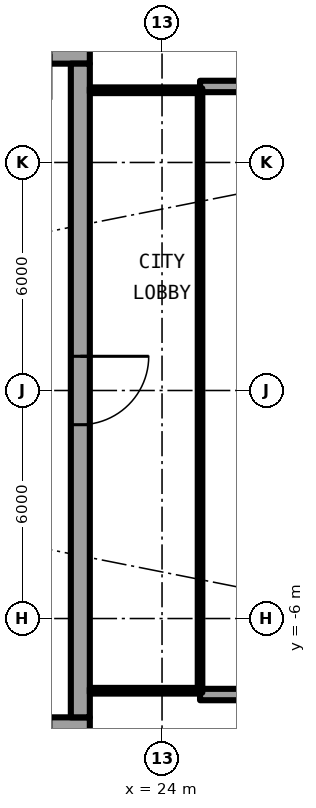
"""IFC4 building model, lengths in metres.
Left out: names, types, materials, properties, quantities, classifications, styles, units other than length and angle.
Written with IfcOpenShell. Run it as: python <this file> out.ifc"""

import sys

from ifc_helpers import new_model, si_unit, direction, frame, frame_2d, origin, place, context, subcontext, project, spatial, rectangle, extrude, element, fill, save


model = new_model("IFC4")
c1 = context("Model", 3, precision=1e-05, world=origin(), true_north=direction((0.0, 1.0)))
c2 = subcontext(c1, "Body", "Model", "MODEL_VIEW")
j1 = project(units=[si_unit("LENGTHUNIT", "METRE"), si_unit("PLANEANGLEUNIT", "RADIAN")], contexts=[c1])
p1 = place(None, origin())
s1 = spatial("IfcSite", under=j1, at=p1, CompositionType="ELEMENT")
p2 = place(p1, origin())
s2 = spatial("IfcBuilding", under=s1, at=p2, CompositionType="ELEMENT")
p3 = place(p2, frame((0.0, 0.0, 167.7)))
s3 = spatial("IfcBuildingStorey", under=s2, at=p3, CompositionType="ELEMENT", Elevation=167.7)
for number, where, z_axis, x_axis in (
    (1, (25.0, 8.0, 0.0), (0.0, 0.0, 1.0), (1.0, 0.0, 0.0)),
    (2, (25.0, -8.0, 0.0), (0.0, 0.0, 1.0), (1.0, 0.0, 0.0)),
):
    element("IfcWall", number, at=place(p3, frame(where, z_axis=z_axis, x_axis=x_axis)), inside=s3, PredefinedType="SOLIDWALL", context=c2, shape_type="SweptSolid", body=[
        extrude(rectangle(XDim=2.667, YDim=0.3, at=frame_2d((1.333, 0.0))), origin(), (0.0, 0.0, 1.0), 2.7),
    ])
p4 = place(p3, frame((22.1, 8.85, 0.0), z_axis=(0.0, 0.0, 1.0), x_axis=(-1.0, 0.0, 0.0)))
e3 = element("IfcWall", 3, at=p4, inside=s3, PredefinedType="SHEAR", context=c2, shape_type="SweptSolid", body=[
    extrude(rectangle(XDim=13.6, YDim=0.5, at=frame_2d((6.8, 0.0))), origin(), (0.0, 0.0, 1.0), 3.05),
])
p5 = place(p4, frame((1.025, 0.0, 0.0)))
e4 = element("IfcOpeningElement", 4, at=p5, cuts=e3, PredefinedType="OPENING", context=c2, shape_type="SweptSolid", body=[
    extrude(rectangle(XDim=1.2, YDim=2.3, at=frame_2d((0.6, 1.15))), frame((0.0, 0.26, 0.0), z_axis=(0.0, -1.0, 0.0), x_axis=(1.0, 0.0, 0.0)), (0.0, 0.0, 1.0), 0.52),
])
p6 = place(p3, frame((8.5, -8.85, 0.0), z_axis=(0.0, 0.0, 1.0), x_axis=(1.0, 0.0, 0.0)))
e5 = element("IfcWall", 5, at=p6, inside=s3, PredefinedType="SHEAR", context=c2, shape_type="SweptSolid", body=[
    extrude(rectangle(XDim=13.6, YDim=0.5, at=frame_2d((6.8, 0.0))), origin(), (0.0, 0.0, 1.0), 3.05),
])
p7 = place(p6, frame((11.375, 0.0, 0.0)))
e6 = element("IfcOpeningElement", 6, at=p7, cuts=e5, PredefinedType="OPENING", context=c2, shape_type="SweptSolid", body=[
    extrude(rectangle(XDim=1.2, YDim=2.3, at=frame_2d((0.6, 1.15))), frame((0.0, 0.26, 0.0), z_axis=(0.0, -1.0, 0.0), x_axis=(1.0, 0.0, 0.0)), (0.0, 0.0, 1.0), 0.52),
])
p8 = place(p3, frame((21.85, 8.6, 0.0), z_axis=(0.0, 0.0, 1.0), x_axis=(0.0, -1.0, 0.0)))
e7 = element("IfcWall", 7, at=p8, inside=s3, PredefinedType="SHEAR", context=c2, shape_type="SweptSolid", body=[
    extrude(rectangle(XDim=17.2, YDim=0.5, at=frame_2d((8.6, 0.0))), origin(), (0.0, 0.0, 1.0), 3.05),
])
p9 = place(p8, frame((7.7, 0.0, 0.0)))
e8 = element("IfcOpeningElement", 8, at=p9, cuts=e7, PredefinedType="OPENING", context=c2, shape_type="SweptSolid", body=[
    extrude(rectangle(XDim=1.8, YDim=2.3, at=frame_2d((0.9, 1.15))), frame((0.0, 0.26, 0.0), z_axis=(0.0, -1.0, 0.0), x_axis=(1.0, 0.0, 0.0)), (0.0, 0.0, 1.0), 0.52),
])
for number, where, z_axis, x_axis in (
    (9, (22.1, -7.9, 0.0), (0.0, 0.0, 1.0), (1.0, 0.0, 0.0)),
    (10, (22.1, 7.9, 0.0), (0.0, 0.0, 1.0), (1.0, 0.0, 0.0)),
):
    element("IfcWall", number, at=place(p3, frame(where, z_axis=z_axis, x_axis=x_axis)), inside=s3, PredefinedType="PARTITIONING", context=c2, shape_type="SweptSolid", body=[
        extrude(rectangle(XDim=2.84, YDim=0.15, at=frame_2d((1.42, 0.0))), origin(), (0.0, 0.0, 1.0), 2.7),
    ])
p10 = place(p3, frame((25.0, -7.95, 0.0), z_axis=(0.0, 0.0, 1.0), x_axis=(0.0, 1.0, 0.0)))
e11 = element("IfcWall", 11, at=p10, inside=s3, PredefinedType="PARTITIONING", context=c2, shape_type="SweptSolid", body=[
    extrude(rectangle(XDim=15.9, YDim=0.12, at=frame_2d((7.95, 0.0))), origin(), (0.0, 0.0, 1.0), 2.7),
])
p11 = place(p10, frame((0.95, 0.0, 0.1)))
e12 = element("IfcOpeningElement", 12, at=p11, cuts=e11, PredefinedType="OPENING", context=c2, shape_type="SweptSolid", body=[
    extrude(rectangle(XDim=14.0, YDim=2.35, at=frame_2d((7.0, 1.175))), frame((0.0, 0.07, 0.0), z_axis=(0.0, -1.0, 0.0), x_axis=(1.0, 0.0, 0.0)), (0.0, 0.0, 1.0), 0.14),
])
p12 = place(p9, origin())
e13 = element("IfcDoor", 13, at=p12, inside=s3, OperationType="SINGLE_SWING_LEFT", PredefinedType="DOOR", context=c2, shape_type="SweptSolid", body=[
    extrude(rectangle(XDim=1.8, YDim=2.3, at=frame_2d((0.9, 1.15))), frame((0.0, 0.025, 0.0), z_axis=(0.0, -1.0, 0.0), x_axis=(1.0, 0.0, 0.0)), (0.0, 0.0, 1.0), 0.05),
])
fill(e8, e13)
p13 = place(p11, origin())
e14 = element("IfcWindow", 14, at=p13, inside=s3, PartitioningType="SINGLE_PANEL", PredefinedType="WINDOW", context=c2, shape_type="SweptSolid", body=[
    extrude(rectangle(XDim=14.0, YDim=2.35, at=frame_2d((7.0, 1.175))), frame((0.0, 0.03, 0.0), z_axis=(0.0, -1.0, 0.0), x_axis=(1.0, 0.0, 0.0)), (0.0, 0.0, 1.0), 0.06),
])
fill(e12, e14)
save(model, sys.argv[1])
